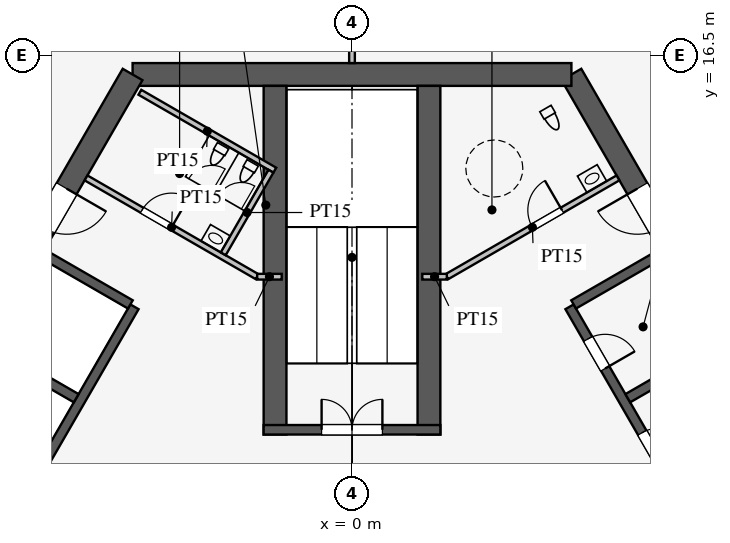
"""IFC4 building model, lengths in metres.
Left out: names, types, materials, properties, quantities, classifications, styles, units other than length and angle.
Written with IfcOpenShell. Run it as: python <this file> out.ifc"""

import sys

from ifc_helpers import new_model, si_unit, direction, frame, frame_2d, origin, place, context, subcontext, project, spatial, rectangle, extrude, element, fill, save


model = new_model("IFC4")
c1 = context("Model", 3, precision=1e-05, world=origin(), true_north=direction((0.0, 1.0)))
c2 = subcontext(c1, "Body", "Model", "MODEL_VIEW")
j1 = project(units=[si_unit("LENGTHUNIT", "METRE"), si_unit("PLANEANGLEUNIT", "RADIAN")], contexts=[c1])
p1 = place(None, origin())
s1 = spatial("IfcSite", under=j1, at=p1, CompositionType="ELEMENT")
p2 = place(p1, origin())
s2 = spatial("IfcBuilding", under=s1, at=p2, CompositionType="ELEMENT")
p3 = place(p2, frame((0.0, 0.0, 305.7)))
s3 = spatial("IfcBuildingStorey", under=s2, at=p3, CompositionType="ELEMENT", Elevation=305.7)
p4 = place(p3, frame((16.743, -3.0, 0.0), z_axis=(0.0, 0.0, 1.0), x_axis=(-0.500002442456, 0.866023993627, 0.0)))
e1 = element("IfcWall", 1, at=p4, inside=s3, PredefinedType="SHEAR", context=c2, shape_type="SweptSolid", body=[
    extrude(rectangle(XDim=21.939, YDim=0.6, at=frame_2d((10.97, 0.0))), origin(), (0.0, 0.0, 1.0), 4.2),
])
p5 = place(p4, frame((17.27, 0.0, 0.0)))
e2 = element("IfcOpeningElement", 2, at=p5, cuts=e1, PredefinedType="OPENING", context=c2, shape_type="SweptSolid", body=[
    extrude(rectangle(XDim=1.2, YDim=2.1, at=frame_2d((0.6, 1.05))), frame((0.0, 0.31, 0.0), z_axis=(0.0, -1.0, 0.0), x_axis=(1.0, 0.0, 0.0)), (0.0, 0.0, 1.0), 0.62),
])
p6 = place(p4, frame((3.47, 0.0, 0.0)))
e3 = element("IfcOpeningElement", 3, at=p6, cuts=e1, PredefinedType="OPENING", context=c2, shape_type="SweptSolid", body=[
    extrude(rectangle(XDim=1.2, YDim=2.1, at=frame_2d((0.6, 1.05))), frame((0.0, 0.31, 0.0), z_axis=(0.0, -1.0, 0.0), x_axis=(1.0, 0.0, 0.0)), (0.0, 0.0, 1.0), 0.62),
])
p7 = place(p3, frame((5.773, 16.0, 0.0), z_axis=(0.0, 0.0, 1.0), x_axis=(-1.0, 0.0, 0.0)))
e4 = element("IfcWall", 4, at=p7, inside=s3, PredefinedType="SHEAR", context=c2, shape_type="SweptSolid", body=[
    extrude(rectangle(XDim=11.547, YDim=0.6, at=frame_2d((5.773, 0.0))), origin(), (0.0, 0.0, 1.0), 4.2),
])
p8 = place(p3, frame((-5.773, 16.0, 0.0), z_axis=(0.0, 0.0, 1.0), x_axis=(-0.500002442456, -0.866023993627, 0.0)))
e5 = element("IfcWall", 5, at=p8, inside=s3, PredefinedType="SHEAR", context=c2, shape_type="SweptSolid", body=[
    extrude(rectangle(XDim=21.939, YDim=0.6, at=frame_2d((10.97, 0.0))), origin(), (0.0, 0.0, 1.0), 4.2),
])
p9 = place(p8, frame((17.27, 0.0, 0.0)))
e6 = element("IfcOpeningElement", 6, at=p9, cuts=e5, PredefinedType="OPENING", context=c2, shape_type="SweptSolid", body=[
    extrude(rectangle(XDim=1.2, YDim=2.1, at=frame_2d((0.6, 1.05))), frame((0.0, 0.31, 0.0), z_axis=(0.0, -1.0, 0.0), x_axis=(1.0, 0.0, 0.0)), (0.0, 0.0, 1.0), 0.62),
])
p10 = place(p8, frame((3.47, 0.0, 0.0)))
e7 = element("IfcOpeningElement", 7, at=p10, cuts=e5, PredefinedType="OPENING", context=c2, shape_type="SweptSolid", body=[
    extrude(rectangle(XDim=1.2, YDim=2.1, at=frame_2d((0.6, 1.05))), frame((0.0, 0.31, 0.0), z_axis=(0.0, -1.0, 0.0), x_axis=(1.0, 0.0, 0.0)), (0.0, 0.0, 1.0), 0.62),
])
p11 = place(p3, frame((11.424, 0.014, 0.0), z_axis=(0.0, 0.0, 1.0), x_axis=(-0.500001763848, 0.866024385424, 0.0)))
e8 = element("IfcWall", 8, at=p11, inside=s3, PredefinedType="SHEAR", context=c2, shape_type="SweptSolid", body=[
    extrude(rectangle(XDim=11.4, YDim=0.25, at=frame_2d((5.7, 0.0))), origin(), (0.0, 0.0, 1.0), 4.2),
])
p12 = place(p11, frame((0.975, 0.0, 0.0)))
e9 = element("IfcOpeningElement", 9, at=p12, cuts=e8, PredefinedType="OPENING", context=c2, shape_type="SweptSolid", body=[
    extrude(rectangle(XDim=0.9, YDim=2.1, at=frame_2d((0.45, 1.05))), frame((0.0, 0.135, 0.0), z_axis=(0.0, -1.0, 0.0), x_axis=(1.0, 0.0, 0.0)), (0.0, 0.0, 1.0), 0.27),
])
p13 = place(p11, frame((3.825, 0.0, 0.0)))
e10 = element("IfcOpeningElement", 10, at=p13, cuts=e8, PredefinedType="OPENING", context=c2, shape_type="SweptSolid", body=[
    extrude(rectangle(XDim=0.9, YDim=2.1, at=frame_2d((0.45, 1.05))), frame((0.0, 0.135, 0.0), z_axis=(0.0, -1.0, 0.0), x_axis=(1.0, 0.0, 0.0)), (0.0, 0.0, 1.0), 0.27),
])
p14 = place(p11, frame((6.675, 0.0, 0.0)))
e11 = element("IfcOpeningElement", 11, at=p14, cuts=e8, PredefinedType="OPENING", context=c2, shape_type="SweptSolid", body=[
    extrude(rectangle(XDim=0.9, YDim=2.1, at=frame_2d((0.45, 1.05))), frame((0.0, 0.135, 0.0), z_axis=(0.0, -1.0, 0.0), x_axis=(1.0, 0.0, 0.0)), (0.0, 0.0, 1.0), 0.27),
])
p15 = place(p11, frame((9.525, 0.0, 0.0)))
e12 = element("IfcOpeningElement", 12, at=p15, cuts=e8, PredefinedType="OPENING", context=c2, shape_type="SweptSolid", body=[
    extrude(rectangle(XDim=0.9, YDim=2.1, at=frame_2d((0.45, 1.05))), frame((0.0, 0.135, 0.0), z_axis=(0.0, -1.0, 0.0), x_axis=(1.0, 0.0, 0.0)), (0.0, 0.0, 1.0), 0.27),
])
for number, where, z_axis, x_axis in (
    (13, (7.257, 7.481, 0.0), (0.0, 0.0, 1.0), (0.866, 0.5, 0.0)),
    (14, (5.832, 9.949, 0.0), (0.0, 0.0, 1.0), (0.866, 0.5, 0.0)),
):
    element("IfcWall", number, at=place(p3, frame(where, z_axis=z_axis, x_axis=x_axis)), inside=s3, PredefinedType="SHEAR", context=c2, shape_type="SweptSolid", body=[
        extrude(rectangle(XDim=2.675, YDim=0.25, at=frame_2d((1.337, 0.0))), origin(), (0.0, 0.0, 1.0), 4.2),
    ])
p16 = place(p3, frame((-5.724, 9.886, 0.0), z_axis=(0.0, 0.0, 1.0), x_axis=(-0.500001763848, -0.866024385424, 0.0)))
e15 = element("IfcWall", 15, at=p16, inside=s3, PredefinedType="SHEAR", context=c2, shape_type="SweptSolid", body=[
    extrude(rectangle(XDim=11.4, YDim=0.25, at=frame_2d((5.7, 0.0))), origin(), (0.0, 0.0, 1.0), 4.2),
])
p17 = place(p16, frame((6.525, 0.0, 0.0)))
e16 = element("IfcOpeningElement", 16, at=p17, cuts=e15, PredefinedType="OPENING", context=c2, shape_type="SweptSolid", body=[
    extrude(rectangle(XDim=1.2, YDim=2.2, at=frame_2d((0.6, 1.1))), frame((0.0, 0.135, 0.0), z_axis=(0.0, -1.0, 0.0), x_axis=(1.0, 0.0, 0.0)), (0.0, 0.0, 1.0), 0.27),
])
p18 = place(p16, frame((9.375, 0.0, 0.0)))
e17 = element("IfcOpeningElement", 17, at=p18, cuts=e15, PredefinedType="OPENING", context=c2, shape_type="SweptSolid", body=[
    extrude(rectangle(XDim=1.2, YDim=2.2, at=frame_2d((0.6, 1.1))), frame((0.0, 0.135, 0.0), z_axis=(0.0, -1.0, 0.0), x_axis=(1.0, 0.0, 0.0)), (0.0, 0.0, 1.0), 0.27),
])
for number, where, z_axis, x_axis in (
    (18, (-5.832, 9.949, 0.0), (0.0, 0.0, 1.0), (-0.866, 0.5, 0.0)),
    (19, (-7.257, 7.481, 0.0), (0.0, 0.0, 1.0), (-0.866, 0.5, 0.0)),
):
    element("IfcWall", number, at=place(p3, frame(where, z_axis=z_axis, x_axis=x_axis)), inside=s3, PredefinedType="SHEAR", context=c2, shape_type="SweptSolid", body=[
        extrude(rectangle(XDim=2.675, YDim=0.25, at=frame_2d((1.337, 0.0))), origin(), (0.0, 0.0, 1.0), 4.2),
    ])
for number, where, z_axis, x_axis in (
    (20, (2.025, 6.525, 0.0), (0.0, 0.0, 1.0), (0.0, 1.0, 0.0)),
    (21, (-2.025, 6.525, 0.0), (0.0, 0.0, 1.0), (0.0, 1.0, 0.0)),
):
    element("IfcWall", number, at=place(p3, frame(where, z_axis=z_axis, x_axis=x_axis)), inside=s3, PredefinedType="SHEAR", context=c2, shape_type="SweptSolid", body=[
        extrude(rectangle(XDim=9.175, YDim=0.6, at=frame_2d((4.587, 0.0))), origin(), (0.0, 0.0, 1.0), 4.2),
    ])
p19 = place(p3, frame((2.325, 6.65, 0.0), z_axis=(0.0, 0.0, 1.0), x_axis=(-1.0, 0.0, 0.0)))
e22 = element("IfcWall", 22, at=p19, inside=s3, PredefinedType="SHEAR", context=c2, shape_type="SweptSolid", body=[
    extrude(rectangle(XDim=4.65, YDim=0.25, at=frame_2d((2.325, 0.0))), origin(), (0.0, 0.0, 1.0), 4.2),
])
p20 = place(p19, frame((1.525, 0.0, 0.0)))
e23 = element("IfcOpeningElement", 23, at=p20, cuts=e22, PredefinedType="OPENING", context=c2, shape_type="SweptSolid", body=[
    extrude(rectangle(XDim=1.6, YDim=2.1, at=frame_2d((0.8, 1.05))), frame((0.0, 0.135, 0.0), z_axis=(0.0, -1.0, 0.0), x_axis=(1.0, 0.0, 0.0)), (0.0, 0.0, 1.0), 0.27),
])
p21 = place(p3, frame((2.495, 10.678, 0.0), z_axis=(0.0, 0.0, 1.0), x_axis=(0.866021400173, 0.500006934395, 0.0)))
e24 = element("IfcWall", 24, at=p21, inside=s3, PredefinedType="PARTITIONING", context=c2, shape_type="SweptSolid", body=[
    extrude(rectangle(XDim=5.2, YDim=0.15, at=frame_2d((2.6, 0.0))), origin(), (0.0, 0.0, 1.0), 4.0),
])
p22 = place(p21, frame((2.6, 0.0, 0.0)))
e25 = element("IfcOpeningElement", 25, at=p22, cuts=e24, PredefinedType="OPENING", context=c2, shape_type="SweptSolid", body=[
    extrude(rectangle(XDim=0.9, YDim=2.1, at=frame_2d((0.45, 1.05))), frame((0.0, 0.085, 0.0), z_axis=(0.0, -1.0, 0.0), x_axis=(1.0, 0.0, 0.0)), (0.0, 0.0, 1.0), 0.17),
])
p23 = place(p3, frame((-2.495, 10.678, 0.0), z_axis=(0.0, 0.0, 1.0), x_axis=(-0.866021400173, 0.500006934395, 0.0)))
e26 = element("IfcWall", 26, at=p23, inside=s3, PredefinedType="PARTITIONING", context=c2, shape_type="SweptSolid", body=[
    extrude(rectangle(XDim=5.2, YDim=0.15, at=frame_2d((2.6, 0.0))), origin(), (0.0, 0.0, 1.0), 4.0),
])
p24 = place(p23, frame((2.6, 0.0, 0.0)))
e27 = element("IfcOpeningElement", 27, at=p24, cuts=e26, PredefinedType="OPENING", context=c2, shape_type="SweptSolid", body=[
    extrude(rectangle(XDim=0.9, YDim=2.1, at=frame_2d((0.45, 1.05))), frame((0.0, 0.085, 0.0), z_axis=(0.0, -1.0, 0.0), x_axis=(1.0, 0.0, 0.0)), (0.0, 0.0, 1.0), 0.17),
])
for number, where, z_axis, x_axis in (
    (28, (2.495, 10.678, 0.0), (0.0, 0.0, 1.0), (-1.0, 0.0, 0.0)),
    (29, (-2.495, 10.678, 0.0), (0.0, 0.0, 1.0), (1.0, 0.0, 0.0)),
):
    element("IfcWall", number, at=place(p3, frame(where, z_axis=z_axis, x_axis=x_axis)), inside=s3, PredefinedType="PARTITIONING", context=c2, shape_type="SweptSolid", body=[
        extrude(rectangle(XDim=0.645, YDim=0.15, at=frame_2d((0.323, 0.0))), origin(), (0.0, 0.0, 1.0), 4.0),
    ])
p25 = place(p3, frame((-2.031, 13.482, 0.0), z_axis=(0.0, 0.0, 1.0), x_axis=(-0.866050731258, 0.499956128963, 0.0)))
e30 = element("IfcWall", 30, at=p25, inside=s3, PredefinedType="PARTITIONING", context=c2, shape_type="SweptSolid", body=[
    extrude(rectangle(XDim=4.1, YDim=0.15, at=frame_2d((2.05, 0.0))), origin(), (0.0, 0.0, 1.0), 4.0),
])
p26 = place(p3, frame((-3.389, 11.281, 0.0), z_axis=(0.0, 0.0, 1.0), x_axis=(0.499989096993, 0.866031698547, 0.0)))
e31 = element("IfcWall", 31, at=p26, inside=s3, PredefinedType="PARTITIONING", context=c2, shape_type="SweptSolid", body=[
    extrude(rectangle(XDim=2.51, YDim=0.15, at=frame_2d((1.255, 0.0))), origin(), (0.0, 0.0, 1.0), 4.0),
])
p27 = place(p3, frame((0.0, 16.3, 0.0), z_axis=(0.0, 0.0, 1.0), x_axis=(0.0, 1.0, 0.0)))
e32 = element("IfcWall", 32, at=p27, inside=s3, PredefinedType="PARTITIONING", context=c2, shape_type="SweptSolid", body=[
    extrude(rectangle(XDim=13.45, YDim=0.15, at=frame_2d((6.725, 0.0))), origin(), (0.0, 0.0, 1.0), 2.5),
])
p28 = place(p22, origin())
e33 = element("IfcDoor", 33, at=p28, inside=s3, OperationType="SINGLE_SWING_RIGHT", PredefinedType="DOOR", context=c2, shape_type="SweptSolid", body=[
    extrude(rectangle(XDim=0.9, YDim=2.1, at=frame_2d((0.45, 1.05))), frame((0.0, 0.025, 0.0), z_axis=(0.0, -1.0, 0.0), x_axis=(1.0, 0.0, 0.0)), (0.0, 0.0, 1.0), 0.05),
])
fill(e25, e33)
p29 = place(p24, frame((0.9, 0.0, 0.0), z_axis=(0.0, 0.0, 1.0), x_axis=(-1.0, 0.0, 0.0)))
e34 = element("IfcDoor", 34, at=p29, inside=s3, OperationType="SINGLE_SWING_RIGHT", PredefinedType="DOOR", context=c2, shape_type="SweptSolid", body=[
    extrude(rectangle(XDim=0.9, YDim=2.1, at=frame_2d((0.45, 1.05))), frame((0.0, 0.025, 0.0), z_axis=(0.0, -1.0, 0.0), x_axis=(1.0, 0.0, 0.0)), (0.0, 0.0, 1.0), 0.05),
])
fill(e27, e34)
p30 = place(p20, frame((1.6, 0.0, 0.0), z_axis=(0.0, 0.0, 1.0), x_axis=(-1.0, 0.0, 0.0)))
e35 = element("IfcDoor", 35, at=p30, inside=s3, OperationType="DOUBLE_DOOR_SINGLE_SWING", PredefinedType="DOOR", context=c2, shape_type="SweptSolid", body=[
    extrude(rectangle(XDim=1.6, YDim=2.1, at=frame_2d((0.8, 1.05))), frame((0.0, 0.025, 0.0), z_axis=(0.0, -1.0, 0.0), x_axis=(1.0, 0.0, 0.0)), (0.0, 0.0, 1.0), 0.05),
])
fill(e23, e35)
p31 = place(p5, origin())
e36 = element("IfcDoor", 36, at=p31, inside=s3, OperationType="SINGLE_SWING_RIGHT", PredefinedType="DOOR", context=c2, shape_type="SweptSolid", body=[
    extrude(rectangle(XDim=1.2, YDim=2.1, at=frame_2d((0.6, 1.05))), frame((0.0, 0.025, 0.0), z_axis=(0.0, -1.0, 0.0), x_axis=(1.0, 0.0, 0.0)), (0.0, 0.0, 1.0), 0.05),
])
fill(e2, e36)
p32 = place(p10, origin())
e37 = element("IfcDoor", 37, at=p32, inside=s3, OperationType="SINGLE_SWING_LEFT", PredefinedType="DOOR", context=c2, shape_type="SweptSolid", body=[
    extrude(rectangle(XDim=1.2, YDim=2.1, at=frame_2d((0.6, 1.05))), frame((0.0, 0.025, 0.0), z_axis=(0.0, -1.0, 0.0), x_axis=(1.0, 0.0, 0.0)), (0.0, 0.0, 1.0), 0.05),
])
fill(e7, e37)
p33 = place(p14, frame((0.9, 0.0, 0.0), z_axis=(0.0, 0.0, 1.0), x_axis=(-1.0, 0.0, 0.0)))
e38 = element("IfcDoor", 38, at=p33, inside=s3, OperationType="SINGLE_SWING_RIGHT", PredefinedType="DOOR", context=c2, shape_type="SweptSolid", body=[
    extrude(rectangle(XDim=0.9, YDim=2.1, at=frame_2d((0.45, 1.05))), frame((0.0, 0.025, 0.0), z_axis=(0.0, -1.0, 0.0), x_axis=(1.0, 0.0, 0.0)), (0.0, 0.0, 1.0), 0.05),
])
fill(e11, e38)
p34 = place(p15, frame((0.9, 0.0, 0.0), z_axis=(0.0, 0.0, 1.0), x_axis=(-1.0, 0.0, 0.0)))
e39 = element("IfcDoor", 39, at=p34, inside=s3, OperationType="SINGLE_SWING_RIGHT", PredefinedType="DOOR", context=c2, shape_type="SweptSolid", body=[
    extrude(rectangle(XDim=0.9, YDim=2.1, at=frame_2d((0.45, 1.05))), frame((0.0, 0.025, 0.0), z_axis=(0.0, -1.0, 0.0), x_axis=(1.0, 0.0, 0.0)), (0.0, 0.0, 1.0), 0.05),
])
fill(e12, e39)
save(model, sys.argv[1])
